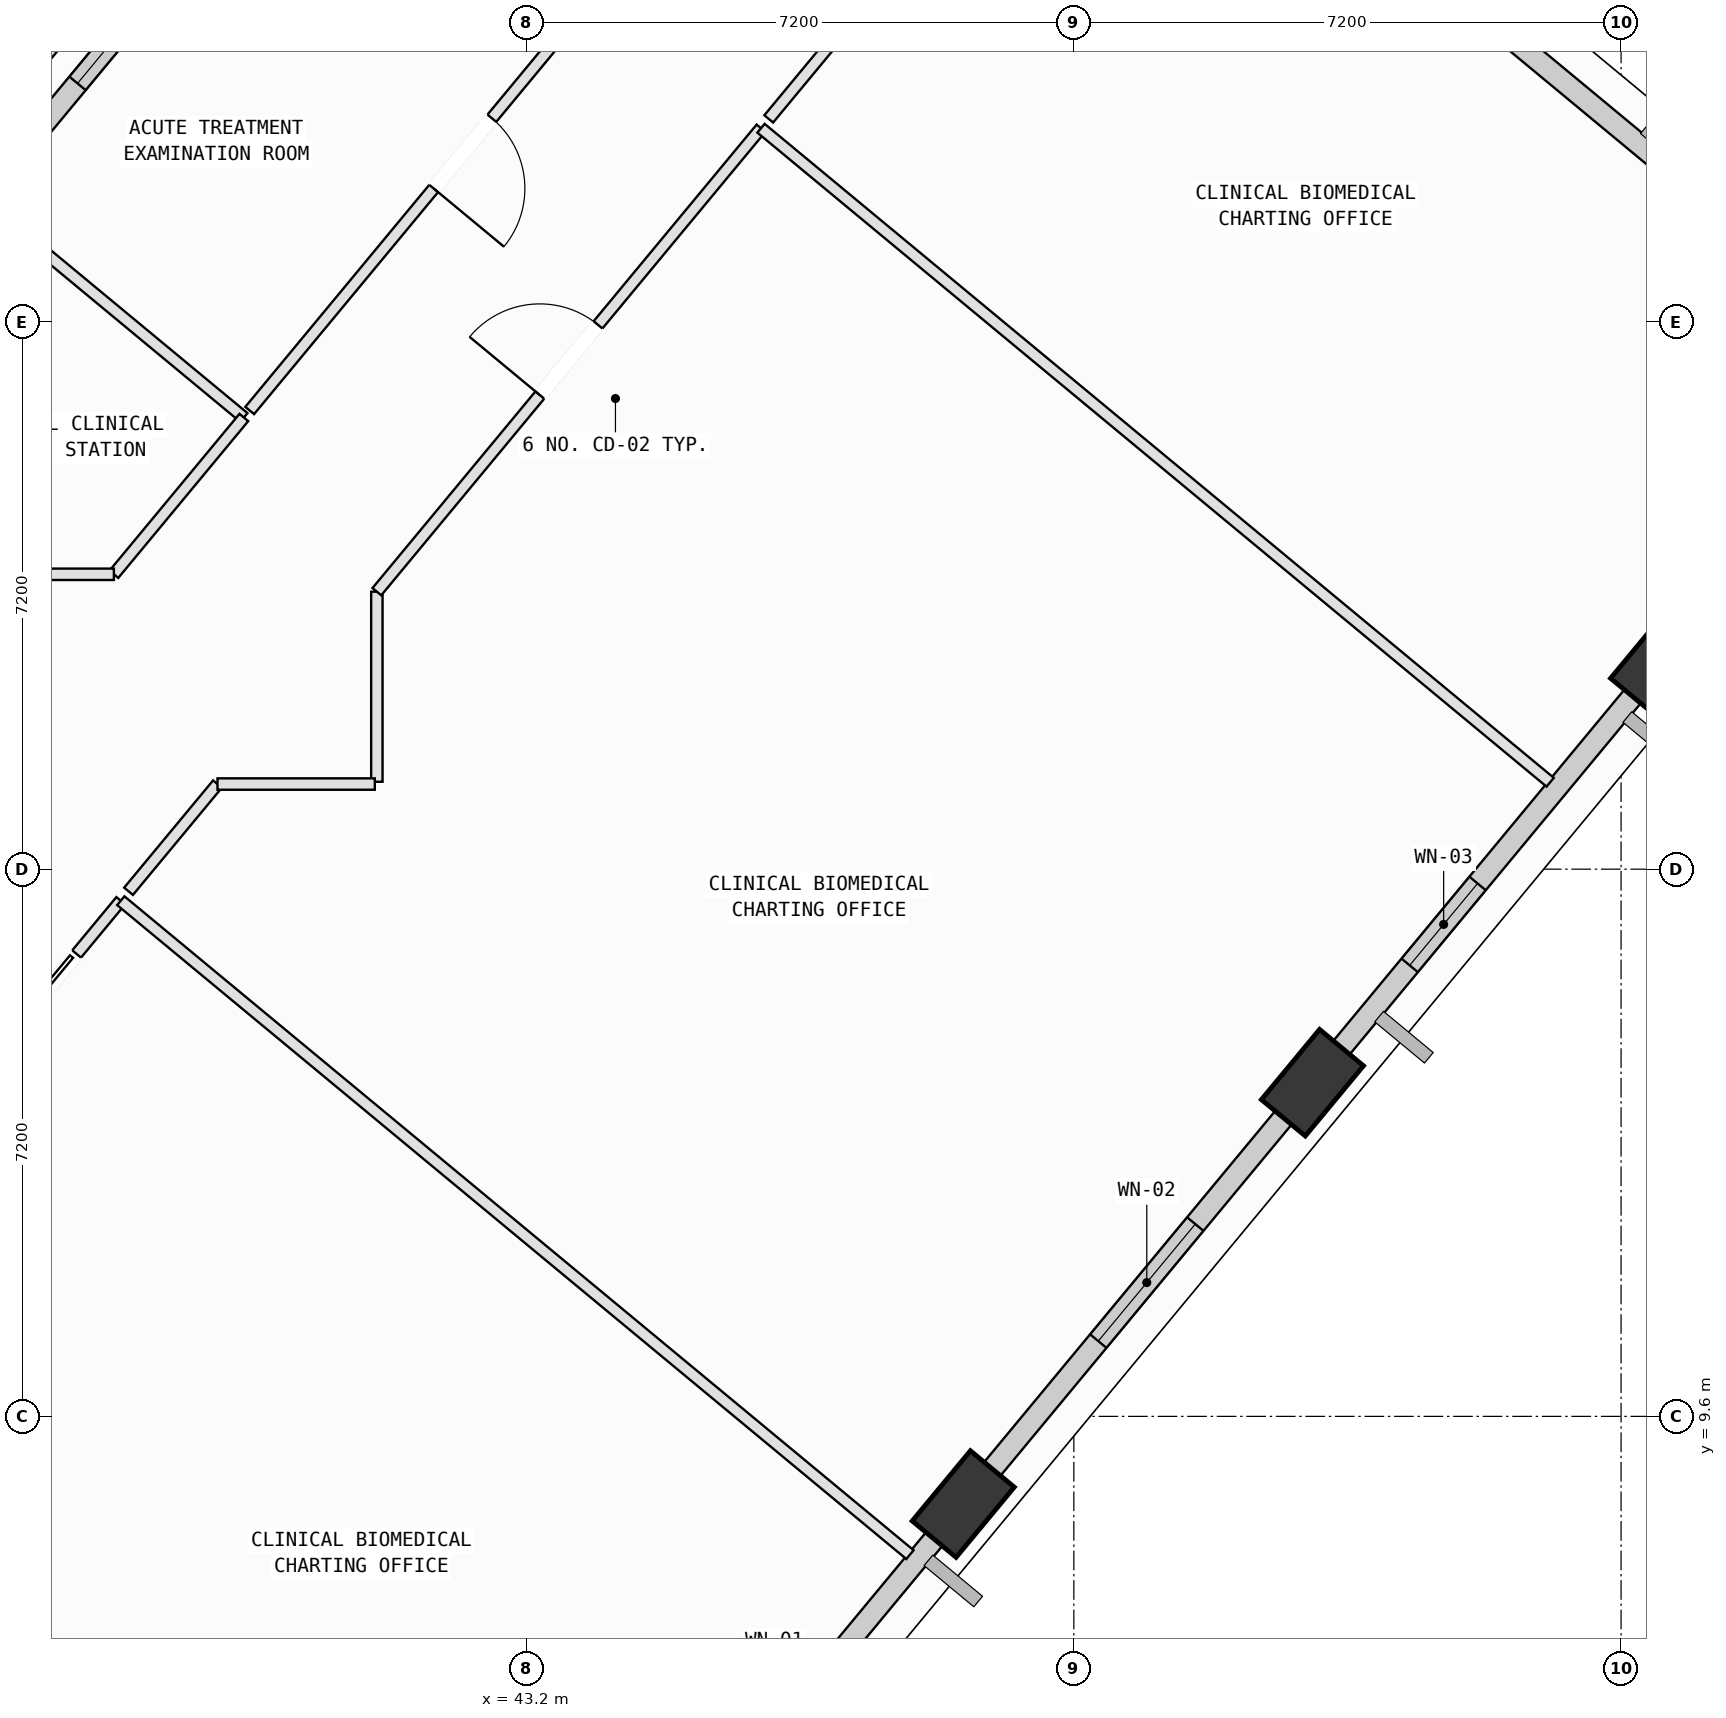
"""IFC4 building model, lengths in metres.
Left out: names, types, materials, properties, quantities, classifications, styles, units other than length and angle.
Written with IfcOpenShell. Run it as: python <this file> out.ifc"""

import sys

from ifc_helpers import new_model, si_unit, direction, frame, frame_2d, origin, origin_2d, place, context, subcontext, project, spatial, rectangle, extrude, element, fill, save


model = new_model("IFC4")
c1 = context("Model", 3, precision=1e-05, world=origin(), true_north=direction((0.0, 1.0)))
c2 = subcontext(c1, "Body", "Model", "MODEL_VIEW")
j1 = project(units=[si_unit("LENGTHUNIT", "METRE"), si_unit("PLANEANGLEUNIT", "RADIAN")], contexts=[c1])
p1 = place(None, origin())
s1 = spatial("IfcSite", under=j1, at=p1, CompositionType="ELEMENT")
p2 = place(p1, origin())
s2 = spatial("IfcBuilding", under=s1, at=p2, CompositionType="ELEMENT")
p3 = place(p2, frame((0.0, 0.0, 239.2)))
s3 = spatial("IfcBuildingStorey", under=s2, at=p3, CompositionType="ELEMENT", Elevation=239.2)
p4 = place(p3, frame((48.945, 8.447, 0.002), z_axis=(0.066972368629, 0.063930934995, 0.995704543221), x_axis=(-0.995148525674, -0.067803912025, 0.071288437797)))
e1 = element("IfcColumn", 1, at=p4, inside=s3, PredefinedType="COLUMN", context=c2, shape_type="SweptSolid", body=[
    extrude(rectangle(XDim=1.2, YDim=0.75, at=origin_2d()), origin(), (0.0, 0.0, 1.0), 4.014),
])
p5 = place(p3, frame((53.539, 13.99, 0.002), z_axis=(0.043914128946, 0.082658311964, 0.995609940058), x_axis=(-0.923162897241, -0.377593091965, 0.072067482668)))
e2 = element("IfcColumn", 2, at=p5, inside=s3, PredefinedType="COLUMN", context=c2, shape_type="SweptSolid", body=[
    extrude(rectangle(XDim=1.2, YDim=0.75, at=origin_2d()), origin(), (0.0, 0.0, 1.0), 4.014),
])
p6 = place(p3, frame((58.134, 19.534, 0.002), z_axis=(0.020841764448, 0.101352953642, 0.994632193146), x_axis=(-0.779271158589, -0.621602053987, 0.079670244575)))
e3 = element("IfcColumn", 3, at=p6, inside=s3, PredefinedType="COLUMN", context=c2, shape_type="SweptSolid", body=[
    extrude(rectangle(XDim=1.2, YDim=0.75, at=origin_2d()), origin(), (0.0, 0.0, 1.0), 4.018),
])
p7 = place(p3, frame((48.809, 8.283, 0.0), z_axis=(0.0, 0.0, 1.0), x_axis=(-0.638092670703, -0.769959572702, 0.0)))
e4 = element("IfcWall", 4, at=p7, inside=s3, PredefinedType="SOLIDWALL", context=c2, shape_type="SweptSolid", body=[
    extrude(rectangle(XDim=6.413, YDim=0.28, at=frame_2d((3.207, 0.0))), origin(), (0.0, 0.0, 1.0), 3.265),
])
p8 = place(p7, frame((2.883, 0.0, 0.75)))
e5 = element("IfcOpeningElement", 5, at=p8, cuts=e4, PredefinedType="OPENING", context=c2, shape_type="SweptSolid", body=[
    extrude(rectangle(XDim=1.6, YDim=1.95, at=frame_2d((0.8, 0.975))), frame((0.0, 0.15, 0.0), z_axis=(0.0, -1.0, 0.0), x_axis=(1.0, 0.0, 0.0)), (0.0, 0.0, 1.0), 0.3),
])
p9 = place(p3, frame((53.404, 13.827, 0.0), z_axis=(0.0, 0.0, 1.0), x_axis=(-0.63810565325, -0.769948813422, 0.0)))
e6 = element("IfcWall", 6, at=p9, inside=s3, PredefinedType="SOLIDWALL", context=c2, shape_type="SweptSolid", body=[
    extrude(rectangle(XDim=6.407, YDim=0.28, at=frame_2d((3.204, 0.0))), origin(), (0.0, 0.0, 1.0), 3.265),
])
p10 = place(p9, frame((2.204, 0.0, 0.75)))
e7 = element("IfcOpeningElement", 7, at=p10, cuts=e6, PredefinedType="OPENING", context=c2, shape_type="SweptSolid", body=[
    extrude(rectangle(XDim=2.0, YDim=1.95, at=frame_2d((1.0, 0.975))), frame((0.0, 0.15, 0.0), z_axis=(0.0, -1.0, 0.0), x_axis=(1.0, 0.0, 0.0)), (0.0, 0.0, 1.0), 0.3),
])
p11 = place(p3, frame((58.005, 19.379, 0.0), z_axis=(0.0, 0.0, 1.0), x_axis=(-0.638068125054, -0.769979913888, 0.0)))
e8 = element("IfcWall", 8, at=p11, inside=s3, PredefinedType="SOLIDWALL", context=c2, shape_type="SweptSolid", body=[
    extrude(rectangle(XDim=6.418, YDim=0.28, at=frame_2d((3.209, 0.0))), origin(), (0.0, 0.0, 1.0), 3.265),
])
p12 = place(p11, frame((3.593, 0.0, 0.75)))
e9 = element("IfcOpeningElement", 9, at=p12, cuts=e8, PredefinedType="OPENING", context=c2, shape_type="SweptSolid", body=[
    extrude(rectangle(XDim=1.4, YDim=1.85, at=frame_2d((0.7, 0.925))), frame((0.0, 0.15, 0.0), z_axis=(0.0, -1.0, 0.0), x_axis=(1.0, 0.0, 0.0)), (0.0, 0.0, 1.0), 0.3),
])
p13 = place(p3, frame((52.924, 30.41, 0.0), z_axis=(0.0, 0.0, 1.0), x_axis=(0.769945199244, -0.638110014152, 0.0)))
e10 = element("IfcWall", 10, at=p13, inside=s3, PredefinedType="SOLIDWALL", context=c2, shape_type="SweptSolid", body=[
    extrude(rectangle(XDim=7.046, YDim=0.28, at=frame_2d((3.523, 0.0))), origin(), (0.0, 0.0, 1.0), 3.265),
])
p14 = place(p3, frame((35.156, 24.561, 0.0), z_axis=(0.0, 0.0, 1.0), x_axis=(0.63811013914, 0.769945095657, 0.0)))
e11 = element("IfcWall", 11, at=p14, inside=s3, PredefinedType="SOLIDWALL", context=c2, shape_type="SweptSolid", body=[
    extrude(rectangle(XDim=6.409, YDim=0.28, at=frame_2d((3.205, 0.0))), origin(), (0.0, 0.0, 1.0), 3.265),
])
p15 = place(p14, frame((3.348, 0.0, 0.75)))
e12 = element("IfcOpeningElement", 12, at=p15, cuts=e11, PredefinedType="OPENING", context=c2, shape_type="SweptSolid", body=[
    extrude(rectangle(XDim=1.4, YDim=1.85, at=frame_2d((0.7, 0.925))), frame((0.0, 0.15, 0.0), z_axis=(0.0, -1.0, 0.0), x_axis=(1.0, 0.0, 0.0)), (0.0, 0.0, 1.0), 0.3),
])
p16 = place(p3, frame((31.446, 7.675, 0.0), z_axis=(0.0, 0.0, 1.0), x_axis=(0.769940315386, -0.638115906982, 0.0)))
e13 = element("IfcWall", 13, at=p16, inside=s3, PredefinedType="PARTITIONING", context=c2, shape_type="SweptSolid", body=[
    extrude(rectangle(XDim=12.866, YDim=0.15, at=frame_2d((6.433, 0.0))), origin(), (0.0, 0.0, 1.0), 3.78),
])
p17 = place(p16, frame((6.256, 0.0, 0.0)))
e14 = element("IfcOpeningElement", 14, at=p17, cuts=e13, PredefinedType="OPENING", context=c2, shape_type="SweptSolid", body=[
    extrude(rectangle(XDim=0.86, YDim=2.06, at=frame_2d((0.43, 1.03))), frame((0.0, 0.085, 0.0), z_axis=(0.0, -1.0, 0.0), x_axis=(1.0, 0.0, 0.0)), (0.0, 0.0, 1.0), 0.17),
])
p18 = place(p3, frame((36.15, 14.321, 0.0), z_axis=(0.0, 0.0, 1.0), x_axis=(0.638247693036, 0.769831073895, 0.0)))
e15 = element("IfcWall", 15, at=p18, inside=s3, PredefinedType="PARTITIONING", context=c2, shape_type="SweptSolid", body=[
    extrude(rectangle(XDim=2.681, YDim=0.15, at=frame_2d((1.341, 0.0))), origin(), (0.0, 0.0, 1.0), 3.78),
])
p19 = place(p18, frame((0.91, 0.0, 0.0)))
e16 = element("IfcOpeningElement", 16, at=p19, cuts=e15, PredefinedType="OPENING", context=c2, shape_type="SweptSolid", body=[
    extrude(rectangle(XDim=0.86, YDim=2.06, at=frame_2d((0.43, 1.03))), frame((0.0, 0.085, 0.0), z_axis=(0.0, -1.0, 0.0), x_axis=(1.0, 0.0, 0.0)), (0.0, 0.0, 1.0), 0.17),
])
p20 = place(p3, frame((37.861, 16.385, 0.0), z_axis=(0.0, 0.0, 1.0), x_axis=(0.769981405267, -0.638066325348, 0.0)))
e17 = element("IfcWall", 17, at=p20, inside=s3, PredefinedType="PARTITIONING", context=c2, shape_type="SweptSolid", body=[
    extrude(rectangle(XDim=13.485, YDim=0.15, at=frame_2d((6.742, 0.0))), origin(), (0.0, 0.0, 1.0), 3.78),
])
p21 = place(p3, frame((41.23, 17.95, 0.0), z_axis=(0.0, 0.0, 1.0), x_axis=(0.0, 1.0, 0.0)))
e18 = element("IfcWall", 18, at=p21, inside=s3, PredefinedType="PARTITIONING", context=c2, shape_type="SweptSolid", body=[
    extrude(rectangle(XDim=2.501, YDim=0.15, at=frame_2d((1.25, 0.0))), origin(), (0.0, 0.0, 1.0), 3.78),
])
p22 = place(p3, frame((41.23, 20.451, 0.0), z_axis=(0.0, 0.0, 1.0), x_axis=(0.638108201762, 0.769946701301, 0.0)))
e19 = element("IfcWall", 19, at=p22, inside=s3, PredefinedType="PARTITIONING", context=c2, shape_type="SweptSolid", body=[
    extrude(rectangle(XDim=7.92, YDim=0.15, at=frame_2d((3.96, 0.0))), origin(), (0.0, 0.0, 1.0), 3.78),
])
p23 = place(p22, frame((3.36, 0.0, 0.0)))
e20 = element("IfcOpeningElement", 20, at=p23, cuts=e19, PredefinedType="OPENING", context=c2, shape_type="SweptSolid", body=[
    extrude(rectangle(XDim=1.2, YDim=2.15, at=frame_2d((0.6, 1.075))), frame((0.0, 0.085, 0.0), z_axis=(0.0, -1.0, 0.0), x_axis=(1.0, 0.0, 0.0)), (0.0, 0.0, 1.0), 0.17),
])
p24 = place(p3, frame((46.284, 26.549, 0.0), z_axis=(0.0, 0.0, 1.0), x_axis=(0.769953196948, -0.638100363978, 0.0)))
e21 = element("IfcWall", 21, at=p24, inside=s3, PredefinedType="PARTITIONING", context=c2, shape_type="SweptSolid", body=[
    extrude(rectangle(XDim=13.485, YDim=0.15, at=frame_2d((6.743, 0.0))), origin(), (0.0, 0.0, 1.0), 3.78),
])
p25 = place(p3, frame((54.086, 14.29, 0.0), z_axis=(0.0, 0.0, 1.0), x_axis=(-0.638148547555, -0.769913262162, 0.0)))
e22 = element("IfcWall", 22, at=p25, inside=s3, PredefinedType="PARTITIONING", context=c2, shape_type="SweptSolid", body=[
    extrude(rectangle(XDim=0.791, YDim=0.15, at=frame_2d((0.396, 0.0))), origin(), (0.0, 0.0, 1.0), 3.265),
])
p26 = place(p3, frame((49.493, 8.748, 0.0), z_axis=(0.0, 0.0, 1.0), x_axis=(-0.638398085615, -0.769706362377, 0.0)))
e23 = element("IfcWall", 23, at=p26, inside=s3, PredefinedType="PARTITIONING", context=c2, shape_type="SweptSolid", body=[
    extrude(rectangle(XDim=0.794, YDim=0.15, at=frame_2d((0.397, 0.0))), origin(), (0.0, 0.0, 1.0), 3.265),
])
p27 = place(p3, frame((37.963, 16.509, 0.0), z_axis=(0.0, 0.0, 1.0), x_axis=(0.638387839665, 0.769714860301, 0.0)))
e24 = element("IfcWall", 24, at=p27, inside=s3, PredefinedType="PARTITIONING", context=c2, shape_type="SweptSolid", body=[
    extrude(rectangle(XDim=1.833, YDim=0.15, at=frame_2d((0.917, 0.0))), origin(), (0.0, 0.0, 1.0), 3.78),
])
p28 = place(p3, frame((39.133, 17.92, 0.0), z_axis=(0.0, 0.0, 1.0), x_axis=(1.0, 0.0, 0.0)))
e25 = element("IfcWall", 25, at=p28, inside=s3, PredefinedType="PARTITIONING", context=c2, shape_type="SweptSolid", body=[
    extrude(rectangle(XDim=2.07, YDim=0.15, at=frame_2d((1.035, 0.0))), origin(), (0.0, 0.0, 1.0), 3.165),
])
p29 = place(p3, frame((46.386, 26.672, 0.0), z_axis=(0.0, 0.0, 1.0), x_axis=(0.638041184216, 0.770002238467, 0.0)))
e26 = element("IfcWall", 26, at=p29, inside=s3, PredefinedType="PARTITIONING", context=c2, shape_type="SweptSolid", body=[
    extrude(rectangle(XDim=6.562, YDim=0.15, at=frame_2d((3.281, 0.0))), origin(), (0.0, 0.0, 1.0), 3.78),
])
p30 = place(p29, frame((2.681, 0.0, 0.0)))
e27 = element("IfcOpeningElement", 27, at=p30, cuts=e26, PredefinedType="OPENING", context=c2, shape_type="SweptSolid", body=[
    extrude(rectangle(XDim=1.2, YDim=2.15, at=frame_2d((0.6, 1.075))), frame((0.0, 0.085, 0.0), z_axis=(0.0, -1.0, 0.0), x_axis=(1.0, 0.0, 0.0)), (0.0, 0.0, 1.0), 0.17),
])
p31 = place(p3, frame((36.111, 25.534, 0.0), z_axis=(0.0, 0.0, 1.0), x_axis=(0.770061509293, -0.637969648107, 0.0)))
e28 = element("IfcWall", 28, at=p31, inside=s3, PredefinedType="PARTITIONING", context=c2, shape_type="SweptSolid", body=[
    extrude(rectangle(XDim=4.375, YDim=0.15, at=frame_2d((2.188, 0.0))), origin(), (0.0, 0.0, 1.0), 3.78),
])
p32 = place(p3, frame((39.48, 22.743, 0.0), z_axis=(0.0, 0.0, 1.0), x_axis=(-0.638156773314, -0.769906444104, 0.0)))
e29 = element("IfcWall", 29, at=p32, inside=s3, PredefinedType="PARTITIONING", context=c2, shape_type="SweptSolid", body=[
    extrude(rectangle(XDim=2.679, YDim=0.15, at=frame_2d((1.34, 0.0))), origin(), (0.0, 0.0, 1.0), 3.78),
])
p33 = place(p3, frame((37.77, 20.68, 0.0), z_axis=(0.0, 0.0, 1.0), x_axis=(-1.0, 0.0, 0.0)))
e30 = element("IfcWall", 30, at=p33, inside=s3, PredefinedType="PARTITIONING", context=c2, shape_type="SweptSolid", body=[
    extrude(rectangle(XDim=5.682, YDim=0.15, at=frame_2d((2.841, 0.0))), origin(), (0.0, 0.0, 1.0), 3.415),
])
p34 = place(p33, frame((2.241, 0.0, 0.0)))
e31 = element("IfcOpeningElement", 31, at=p34, cuts=e30, PredefinedType="OPENING", context=c2, shape_type="SweptSolid", body=[
    extrude(rectangle(XDim=1.2, YDim=2.15, at=frame_2d((0.6, 1.075))), frame((0.0, 0.085, 0.0), z_axis=(0.0, -1.0, 0.0), x_axis=(1.0, 0.0, 0.0)), (0.0, 0.0, 1.0), 0.17),
])
p35 = place(p3, frame((45.164, 29.602, 0.0), z_axis=(0.0, 0.0, 1.0), x_axis=(-0.638028689029, -0.770012592089, 0.0)))
e32 = element("IfcWall", 32, at=p35, inside=s3, PredefinedType="PARTITIONING", context=c2, shape_type="SweptSolid", body=[
    extrude(rectangle(XDim=8.788, YDim=0.15, at=frame_2d((4.394, 0.0))), origin(), (0.0, 0.0, 1.0), 3.78),
])
p36 = place(p35, frame((3.794, 0.0, 0.0)))
e33 = element("IfcOpeningElement", 33, at=p36, cuts=e32, PredefinedType="OPENING", context=c2, shape_type="SweptSolid", body=[
    extrude(rectangle(XDim=1.2, YDim=2.15, at=frame_2d((0.6, 1.075))), frame((0.0, 0.085, 0.0), z_axis=(0.0, -1.0, 0.0), x_axis=(1.0, 0.0, 0.0)), (0.0, 0.0, 1.0), 0.17),
])
p37 = place(p3, frame((35.676, 26.051, 0.0), z_axis=(0.0, 0.0, 1.0), x_axis=(0.638078099411, 0.769971648213, 0.0)))
e34 = element("IfcWall", 34, at=p37, inside=s3, PredefinedType="PARTITIONING", context=c2, shape_type="SweptSolid", body=[
    extrude(rectangle(XDim=8.789, YDim=0.15, at=frame_2d((4.395, 0.0))), origin(), (0.0, 0.0, 1.0), 3.265),
])
p38 = place(p10, origin())
e35 = element("IfcWindow", 35, at=p38, inside=s3, PartitioningType="SINGLE_PANEL", PredefinedType="WINDOW", context=c2, shape_type="SweptSolid", body=[
    extrude(rectangle(XDim=2.0, YDim=1.95, at=frame_2d((1.0, 0.975))), frame((0.0, 0.03, 0.0), z_axis=(0.0, -1.0, 0.0), x_axis=(1.0, 0.0, 0.0)), (0.0, 0.0, 1.0), 0.06),
])
fill(e7, e35)
p39 = place(p12, origin())
e36 = element("IfcWindow", 36, at=p39, inside=s3, PartitioningType="SINGLE_PANEL", PredefinedType="WINDOW", context=c2, shape_type="SweptSolid", body=[
    extrude(rectangle(XDim=1.4, YDim=1.85, at=frame_2d((0.7, 0.925))), frame((0.0, 0.03, 0.0), z_axis=(0.0, -1.0, 0.0), x_axis=(1.0, 0.0, 0.0)), (0.0, 0.0, 1.0), 0.06),
])
fill(e9, e36)
p40 = place(p15, origin())
e37 = element("IfcWindow", 37, at=p40, inside=s3, PartitioningType="SINGLE_PANEL", PredefinedType="WINDOW", context=c2, shape_type="SweptSolid", body=[
    extrude(rectangle(XDim=1.4, YDim=1.85, at=frame_2d((0.7, 0.925))), frame((0.0, 0.03, 0.0), z_axis=(0.0, -1.0, 0.0), x_axis=(1.0, 0.0, 0.0)), (0.0, 0.0, 1.0), 0.06),
])
fill(e12, e37)
p41 = place(p19, origin())
e38 = element("IfcDoor", 38, at=p41, inside=s3, OperationType="SLIDING_TO_LEFT", PredefinedType="DOOR", context=c2, shape_type="SweptSolid", body=[
    extrude(rectangle(XDim=0.86, YDim=2.06, at=frame_2d((0.43, 1.03))), frame((0.0, 0.025, 0.0), z_axis=(0.0, -1.0, 0.0), x_axis=(1.0, 0.0, 0.0)), (0.0, 0.0, 1.0), 0.05),
])
fill(e16, e38)
p42 = place(p23, origin())
e39 = element("IfcDoor", 39, at=p42, inside=s3, OperationType="SINGLE_SWING_LEFT", PredefinedType="DOOR", context=c2, shape_type="SweptSolid", body=[
    extrude(rectangle(XDim=1.2, YDim=2.15, at=frame_2d((0.6, 1.075))), frame((0.0, 0.025, 0.0), z_axis=(0.0, -1.0, 0.0), x_axis=(1.0, 0.0, 0.0)), (0.0, 0.0, 1.0), 0.05),
])
fill(e20, e39)
p43 = place(p36, origin())
e40 = element("IfcDoor", 40, at=p43, inside=s3, OperationType="SINGLE_SWING_RIGHT", PredefinedType="DOOR", context=c2, shape_type="SweptSolid", body=[
    extrude(rectangle(XDim=1.2, YDim=2.15, at=frame_2d((0.6, 1.075))), frame((0.0, 0.025, 0.0), z_axis=(0.0, -1.0, 0.0), x_axis=(1.0, 0.0, 0.0)), (0.0, 0.0, 1.0), 0.05),
])
fill(e33, e40)
save(model, sys.argv[1])
